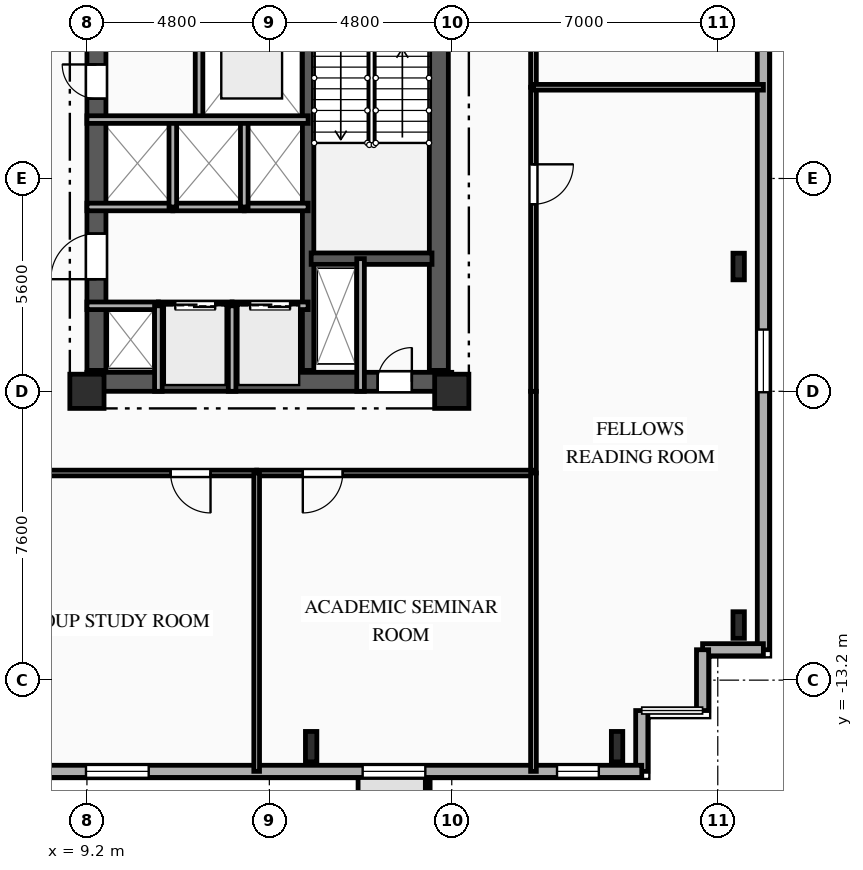
"""IFC4 building model, lengths in metres.
Left out: names, types, materials, properties, quantities, classifications, styles, units other than length and angle.
Written with IfcOpenShell. Run it as: python <this file> out.ifc"""

import sys

from ifc_helpers import new_model, si_unit, direction, frame, frame_2d, origin, origin_2d, place, context, subcontext, project, spatial, rectangle, i_section, extrude, element, fill, save


model = new_model("IFC4")
c1 = context("Model", 3, precision=1e-05, world=origin(), true_north=direction((0.0, 1.0)))
c2 = subcontext(c1, "Body", "Model", "MODEL_VIEW")
j1 = project(units=[si_unit("LENGTHUNIT", "METRE"), si_unit("PLANEANGLEUNIT", "RADIAN")], contexts=[c1])
p1 = place(None, origin())
s1 = spatial("IfcSite", under=j1, at=p1, CompositionType="ELEMENT")
p2 = place(p1, origin())
s2 = spatial("IfcBuilding", under=s1, at=p2, CompositionType="ELEMENT")
p3 = place(p2, frame((0.0, 0.0, 167.85)))
s3 = spatial("IfcBuildingStorey", under=s2, at=p3, CompositionType="ELEMENT", Elevation=167.85)
for number, where, z_axis, x_axis in (
    (1, (9.2, -5.6, 0.0), (0.0, 0.0, 1.0), (1.0, 0.0, 0.0)),
    (2, (18.8, -5.6, 0.0), (0.0, 0.0, 1.0), (1.0, 0.0, 0.0)),
):
    element("IfcColumn", number, at=place(p3, frame(where, z_axis=z_axis, x_axis=x_axis)), inside=s3, PredefinedType="COLUMN", context=c2, shape_type="SweptSolid", body=[
        extrude(rectangle(XDim=0.9, YDim=0.9, at=origin_2d()), origin(), (0.0, 0.0, 1.0), 3.35),
    ])
for number, where, z_axis, x_axis in (
    (3, (15.1, -14.95, 0.0), (0.0, 0.0, 1.0), (1.0, 0.0, 0.0)),
    (4, (23.15, -14.95, 0.0), (0.0, 0.0, 1.0), (1.0, 0.0, 0.0)),
):
    element("IfcColumn", number, at=place(p3, frame(where, z_axis=z_axis, x_axis=x_axis)), inside=s3, PredefinedType="COLUMN", context=c2, shape_type="SweptSolid", body=[
        extrude(i_section(OverallWidth=0.3, OverallDepth=0.8, WebThickness=0.018, FlangeThickness=0.033, FilletRadius=0.03, at=origin_2d()), origin(), (0.0, 0.0, 1.0), 3.35),
    ])
for number, where, z_axis, x_axis in (
    (5, (26.35, -11.75, 0.0), (0.0, 0.0, 1.0), (1.0, 0.0, 0.0)),
    (6, (26.35, -2.317, 0.0), (0.0, 0.0, 1.0), (1.0, 0.0, 0.0)),
):
    element("IfcColumn", number, at=place(p3, frame(where, z_axis=z_axis, x_axis=x_axis)), inside=s3, PredefinedType="COLUMN", context=c2, shape_type="SweptSolid", body=[
        extrude(i_section(OverallWidth=0.3, OverallDepth=0.7, WebThickness=0.017, FlangeThickness=0.032, FilletRadius=0.027, at=origin_2d()), origin(), (0.0, 0.0, 1.0), 3.35),
    ])
p4 = place(p3, frame((27.0, 17.2, 0.0), z_axis=(0.0, 0.0, 1.0), x_axis=(0.0, -1.0, 0.0)))
e7 = element("IfcWall", 7, at=p4, inside=s3, PredefinedType="SOLIDWALL", context=c2, shape_type="SweptSolid", body=[
    extrude(rectangle(XDim=29.6, YDim=0.32, at=frame_2d((14.8, 0.0))), origin(), (0.0, 0.0, 1.0), 3.04),
])
p5 = place(p4, frame((6.815, 0.0, 0.85)))
e8 = element("IfcOpeningElement", 8, at=p5, cuts=e7, PredefinedType="OPENING", context=c2, shape_type="SweptSolid", body=[
    extrude(rectangle(XDim=1.65, YDim=1.85, at=frame_2d((0.825, 0.925))), frame((0.0, 0.17, 0.0), z_axis=(0.0, -1.0, 0.0), x_axis=(1.0, 0.0, 0.0)), (0.0, 0.0, 1.0), 0.34),
])
p6 = place(p4, frame((21.175, 0.0, 0.85)))
e9 = element("IfcOpeningElement", 9, at=p6, cuts=e7, PredefinedType="OPENING", context=c2, shape_type="SweptSolid", body=[
    extrude(rectangle(XDim=1.65, YDim=1.85, at=frame_2d((0.825, 0.925))), frame((0.0, 0.17, 0.0), z_axis=(0.0, -1.0, 0.0), x_axis=(1.0, 0.0, 0.0)), (0.0, 0.0, 1.0), 0.34),
])
for number, where, z_axis, x_axis in (
    (10, (27.0, -12.4, 0.0), (0.0, 0.0, 1.0), (-1.0, 0.0, 0.0)),
    (11, (25.4, -12.4, 0.0), (0.0, 0.0, 1.0), (0.0, -1.0, 0.0)),
    (12, (23.8, -14.0, 0.0), (0.0, 0.0, 1.0), (0.0, -1.0, 0.0)),
):
    element("IfcWall", number, at=place(p3, frame(where, z_axis=z_axis, x_axis=x_axis)), inside=s3, PredefinedType="SOLIDWALL", context=c2, shape_type="SweptSolid", body=[
        extrude(rectangle(XDim=1.6, YDim=0.32, at=frame_2d((0.8, 0.0))), origin(), (0.0, 0.0, 1.0), 3.04),
    ])
p7 = place(p3, frame((23.8, -15.6, 0.0), z_axis=(0.0, 0.0, 1.0), x_axis=(-1.0, 0.0, 0.0)))
e13 = element("IfcWall", 13, at=p7, inside=s3, PredefinedType="SOLIDWALL", context=c2, shape_type="SweptSolid", body=[
    extrude(rectangle(XDim=49.6, YDim=0.32, at=frame_2d((24.8, 0.0))), origin(), (0.0, 0.0, 1.0), 3.04),
])
p8 = place(p7, frame((1.13, 0.0, 0.85)))
e14 = element("IfcOpeningElement", 14, at=p8, cuts=e13, PredefinedType="OPENING", context=c2, shape_type="SweptSolid", body=[
    extrude(rectangle(XDim=1.1, YDim=1.85, at=frame_2d((0.55, 0.925))), frame((0.0, 0.17, 0.0), z_axis=(0.0, -1.0, 0.0), x_axis=(1.0, 0.0, 0.0)), (0.0, 0.0, 1.0), 0.34),
])
p9 = place(p7, frame((5.695, 0.0, 0.85)))
e15 = element("IfcOpeningElement", 15, at=p9, cuts=e13, PredefinedType="OPENING", context=c2, shape_type="SweptSolid", body=[
    extrude(rectangle(XDim=1.65, YDim=1.85, at=frame_2d((0.825, 0.925))), frame((0.0, 0.17, 0.0), z_axis=(0.0, -1.0, 0.0), x_axis=(1.0, 0.0, 0.0)), (0.0, 0.0, 1.0), 0.34),
])
p10 = place(p7, frame((12.975, 0.0, 0.85)))
e16 = element("IfcOpeningElement", 16, at=p10, cuts=e13, PredefinedType="OPENING", context=c2, shape_type="SweptSolid", body=[
    extrude(rectangle(XDim=1.65, YDim=1.85, at=frame_2d((0.825, 0.925))), frame((0.0, 0.17, 0.0), z_axis=(0.0, -1.0, 0.0), x_axis=(1.0, 0.0, 0.0)), (0.0, 0.0, 1.0), 0.34),
])
p11 = place(p7, frame((21.636, 0.0, 0.85)))
e17 = element("IfcOpeningElement", 17, at=p11, cuts=e13, PredefinedType="OPENING", context=c2, shape_type="SweptSolid", body=[
    extrude(rectangle(XDim=2.2, YDim=1.85, at=frame_2d((1.1, 0.925))), frame((0.0, 0.17, 0.0), z_axis=(0.0, -1.0, 0.0), x_axis=(1.0, 0.0, 0.0)), (0.0, 0.0, 1.0), 0.34),
])
p12 = place(p7, frame((33.935, 0.0, 0.85)))
e18 = element("IfcOpeningElement", 18, at=p12, cuts=e13, PredefinedType="OPENING", context=c2, shape_type="SweptSolid", body=[
    extrude(rectangle(XDim=1.65, YDim=1.85, at=frame_2d((0.825, 0.925))), frame((0.0, 0.17, 0.0), z_axis=(0.0, -1.0, 0.0), x_axis=(1.0, 0.0, 0.0)), (0.0, 0.0, 1.0), 0.34),
])
p13 = place(p7, frame((41.24, 0.0, 0.85)))
e19 = element("IfcOpeningElement", 19, at=p13, cuts=e13, PredefinedType="OPENING", context=c2, shape_type="SweptSolid", body=[
    extrude(rectangle(XDim=1.65, YDim=1.85, at=frame_2d((0.825, 0.925))), frame((0.0, 0.17, 0.0), z_axis=(0.0, -1.0, 0.0), x_axis=(1.0, 0.0, 0.0)), (0.0, 0.0, 1.0), 0.34),
])
p14 = place(p7, frame((46.175, 0.0, 0.85)))
e20 = element("IfcOpeningElement", 20, at=p14, cuts=e13, PredefinedType="OPENING", context=c2, shape_type="SweptSolid", body=[
    extrude(rectangle(XDim=1.65, YDim=1.85, at=frame_2d((0.825, 0.925))), frame((0.0, 0.17, 0.0), z_axis=(0.0, -1.0, 0.0), x_axis=(1.0, 0.0, 0.0)), (0.0, 0.0, 1.0), 0.34),
])
p15 = place(p3, frame((9.2, -5.35, 0.0), z_axis=(0.0, 0.0, 1.0), x_axis=(1.0, 0.0, 0.0)))
e21 = element("IfcWall", 21, at=p15, inside=s3, PredefinedType="SHEAR", context=c2, shape_type="SweptSolid", body=[
    extrude(rectangle(XDim=9.6, YDim=0.5, at=frame_2d((4.8, 0.0))), origin(), (0.0, 0.0, 1.0), 3.04),
])
p16 = place(p15, frame((7.65, 0.0, 0.0)))
e22 = element("IfcOpeningElement", 22, at=p16, cuts=e21, PredefinedType="OPENING", context=c2, shape_type="SweptSolid", body=[
    extrude(rectangle(XDim=0.9, YDim=2.1, at=frame_2d((0.45, 1.05))), frame((0.0, 0.26, 0.0), z_axis=(0.0, -1.0, 0.0), x_axis=(1.0, 0.0, 0.0)), (0.0, 0.0, 1.0), 0.52),
])
p17 = place(p3, frame((9.45, -5.05, 0.0), z_axis=(0.0, 0.0, 1.0), x_axis=(0.0, 1.0, 0.0)))
e23 = element("IfcWall", 23, at=p17, inside=s3, PredefinedType="SHEAR", context=c2, shape_type="SweptSolid", body=[
    extrude(rectangle(XDim=10.1, YDim=0.5, at=frame_2d((5.05, 0.0))), origin(), (0.0, 0.0, 1.0), 3.04),
])
p18 = place(p17, frame((7.15, 0.0, 0.0)))
e24 = element("IfcOpeningElement", 24, at=p18, cuts=e23, PredefinedType="OPENING", context=c2, shape_type="SweptSolid", body=[
    extrude(rectangle(XDim=0.9, YDim=2.1, at=frame_2d((0.45, 1.05))), frame((0.0, 0.26, 0.0), z_axis=(0.0, -1.0, 0.0), x_axis=(1.0, 0.0, 0.0)), (0.0, 0.0, 1.0), 0.52),
])
p19 = place(p17, frame((2.4, 0.0, 0.0)))
e25 = element("IfcOpeningElement", 25, at=p19, cuts=e23, PredefinedType="OPENING", context=c2, shape_type="SweptSolid", body=[
    extrude(rectangle(XDim=1.2, YDim=2.15, at=frame_2d((0.6, 1.075))), frame((0.0, 0.26, 0.0), z_axis=(0.0, -1.0, 0.0), x_axis=(1.0, 0.0, 0.0)), (0.0, 0.0, 1.0), 0.52),
])
p20 = place(p3, frame((18.46, -5.05, 0.0), z_axis=(0.0, 0.0, 1.0), x_axis=(0.0, 1.0, 0.0)))
e26 = element("IfcWall", 26, at=p20, inside=s3, PredefinedType="SHEAR", context=c2, shape_type="SweptSolid", body=[
    extrude(rectangle(XDim=10.1, YDim=0.5, at=frame_2d((5.05, 0.0))), origin(), (0.0, 0.0, 1.0), 3.04),
])
p21 = place(p3, frame((15.02, -5.05, 0.0), z_axis=(0.0, 0.0, 1.0), x_axis=(0.0, 1.0, 0.0)))
e27 = element("IfcWall", 27, at=p21, inside=s3, PredefinedType="SHEAR", context=c2, shape_type="SweptSolid", body=[
    extrude(rectangle(XDim=10.1, YDim=0.3, at=frame_2d((5.05, 0.0))), origin(), (0.0, 0.0, 1.0), 3.04),
])
p22 = place(p3, frame((15.1, -2.11, 0.0), z_axis=(0.0, 0.0, 1.0), x_axis=(1.0, 0.0, 0.0)))
e28 = element("IfcWall", 28, at=p22, inside=s3, PredefinedType="SHEAR", context=c2, shape_type="SweptSolid", body=[
    extrude(rectangle(XDim=3.18, YDim=0.3, at=frame_2d((1.59, 0.0))), origin(), (0.0, 0.0, 1.0), 3.04),
])
p23 = place(p3, frame((16.4, -2.11, 0.0), z_axis=(0.0, 0.0, 1.0), x_axis=(0.0, -1.0, 0.0)))
e29 = element("IfcWall", 29, at=p23, inside=s3, PredefinedType="PARTITIONING", context=c2, shape_type="SweptSolid", body=[
    extrude(rectangle(XDim=3.49, YDim=0.2, at=frame_2d((1.745, 0.0))), origin(), (0.0, 0.0, 1.0), 3.04),
])
p24 = place(p3, frame((12.15, 5.6, 0.0), z_axis=(0.0, 0.0, 1.0), x_axis=(0.0, -1.0, 0.0)))
e30 = element("IfcWall", 30, at=p24, inside=s3, PredefinedType="PARTITIONING", context=c2, shape_type="SweptSolid", body=[
    extrude(rectangle(XDim=4.05, YDim=0.2, at=frame_2d((2.025, 0.0))), origin(), (0.0, 0.0, 1.0), 3.04),
])
p25 = place(p3, frame((9.2, -3.35, 0.0), z_axis=(0.0, 0.0, 1.0), x_axis=(1.0, 0.0, 0.0)))
e31 = element("IfcWall", 31, at=p25, inside=s3, PredefinedType="PARTITIONING", context=c2, shape_type="SweptSolid", body=[
    extrude(rectangle(XDim=1.88, YDim=0.2, at=frame_2d((0.94, 0.0))), origin(), (0.0, 0.0, 1.0), 2.755),
])
p26 = place(p3, frame((11.08, -3.35, 0.0), z_axis=(0.0, 0.0, 1.0), x_axis=(1.0, 0.0, 0.0)))
e32 = element("IfcWall", 32, at=p26, inside=s3, PredefinedType="PARTITIONING", context=c2, shape_type="SweptSolid", body=[
    extrude(rectangle(XDim=1.94, YDim=0.2, at=frame_2d((0.97, 0.0))), origin(), (0.0, 0.0, 1.0), 3.04),
])
p27 = place(p26, frame((0.445, 0.0, 0.0)))
e33 = element("IfcOpeningElement", 33, at=p27, cuts=e32, PredefinedType="OPENING", context=c2, shape_type="SweptSolid", body=[
    extrude(rectangle(XDim=1.05, YDim=2.1, at=frame_2d((0.525, 1.05))), frame((0.0, 0.11, 0.0), z_axis=(0.0, -1.0, 0.0), x_axis=(1.0, 0.0, 0.0)), (0.0, 0.0, 1.0), 0.22),
])
p28 = place(p3, frame((13.02, -3.35, 0.0), z_axis=(0.0, 0.0, 1.0), x_axis=(1.0, 0.0, 0.0)))
e34 = element("IfcWall", 34, at=p28, inside=s3, PredefinedType="PARTITIONING", context=c2, shape_type="SweptSolid", body=[
    extrude(rectangle(XDim=2.0, YDim=0.2, at=frame_2d((1.0, 0.0))), origin(), (0.0, 0.0, 1.0), 3.04),
])
p29 = place(p28, frame((0.475, 0.0, 0.0)))
e35 = element("IfcOpeningElement", 35, at=p29, cuts=e34, PredefinedType="OPENING", context=c2, shape_type="SweptSolid", body=[
    extrude(rectangle(XDim=1.05, YDim=2.1, at=frame_2d((0.525, 1.05))), frame((0.0, 0.11, 0.0), z_axis=(0.0, -1.0, 0.0), x_axis=(1.0, 0.0, 0.0)), (0.0, 0.0, 1.0), 0.22),
])
p30 = place(p3, frame((11.46, -0.75, 0.0), z_axis=(0.0, 0.0, 1.0), x_axis=(-1.0, 0.0, 0.0)))
e36 = element("IfcWall", 36, at=p30, inside=s3, PredefinedType="PARTITIONING", context=c2, shape_type="SweptSolid", body=[
    extrude(rectangle(XDim=2.26, YDim=0.2, at=frame_2d((1.13, 0.0))), origin(), (0.0, 0.0, 1.0), 3.04),
])
p31 = place(p3, frame((13.34, -0.75, 0.0), z_axis=(0.0, 0.0, 1.0), x_axis=(-1.0, 0.0, 0.0)))
e37 = element("IfcWall", 37, at=p31, inside=s3, PredefinedType="PARTITIONING", context=c2, shape_type="SweptSolid", body=[
    extrude(rectangle(XDim=1.88, YDim=0.2, at=frame_2d((0.94, 0.0))), origin(), (0.0, 0.0, 1.0), 3.04),
])
p32 = place(p3, frame((15.02, -0.75, 0.0), z_axis=(0.0, 0.0, 1.0), x_axis=(-1.0, 0.0, 0.0)))
e38 = element("IfcWall", 38, at=p32, inside=s3, PredefinedType="PARTITIONING", context=c2, shape_type="SweptSolid", body=[
    extrude(rectangle(XDim=1.68, YDim=0.2, at=frame_2d((0.84, 0.0))), origin(), (0.0, 0.0, 1.0), 3.04),
])
for number, where, z_axis, x_axis in (
    (39, (11.08, -5.6, 0.0), (0.0, 0.0, 1.0), (0.0, 1.0, 0.0)),
    (40, (13.02, -5.6, 0.0), (0.0, 0.0, 1.0), (0.0, 1.0, 0.0)),
):
    element("IfcWall", number, at=place(p3, frame(where, z_axis=z_axis, x_axis=x_axis)), inside=s3, PredefinedType="PARTITIONING", context=c2, shape_type="SweptSolid", body=[
        extrude(rectangle(XDim=2.25, YDim=0.2, at=frame_2d((1.125, 0.0))), origin(), (0.0, 0.0, 1.0), 3.04),
    ])
for number, where, z_axis, x_axis in (
    (41, (11.46, -0.75, 0.0), (0.0, 0.0, 1.0), (0.0, 1.0, 0.0)),
    (42, (13.34, -0.75, 0.0), (0.0, 0.0, 1.0), (0.0, 1.0, 0.0)),
):
    element("IfcWall", number, at=place(p3, frame(where, z_axis=z_axis, x_axis=x_axis)), inside=s3, PredefinedType="PARTITIONING", context=c2, shape_type="SweptSolid", body=[
        extrude(rectangle(XDim=2.3, YDim=0.2, at=frame_2d((1.15, 0.0))), origin(), (0.0, 0.0, 1.0), 3.04),
    ])
p33 = place(p3, frame((20.95, -5.6, 0.0), z_axis=(0.0, 0.0, 1.0), x_axis=(0.0, -1.0, 0.0)))
e43 = element("IfcWall", 43, at=p33, inside=s3, PredefinedType="PARTITIONING", context=c2, shape_type="SweptSolid", body=[
    extrude(rectangle(XDim=2.15, YDim=0.15, at=frame_2d((1.075, 0.0))), origin(), (0.0, 0.0, 1.0), 3.04),
])
p34 = place(p3, frame((13.667, -7.75, 0.0), z_axis=(0.0, 0.0, 1.0), x_axis=(-1.0, 0.0, 0.0)))
e44 = element("IfcWall", 44, at=p34, inside=s3, PredefinedType="PARTITIONING", context=c2, shape_type="SweptSolid", body=[
    extrude(rectangle(XDim=7.283, YDim=0.15, at=frame_2d((3.642, 0.0))), origin(), (0.0, 0.0, 1.0), 3.04),
])
p35 = place(p34, frame((1.214, 0.0, 0.0)))
e45 = element("IfcOpeningElement", 45, at=p35, cuts=e44, PredefinedType="OPENING", context=c2, shape_type="SweptSolid", body=[
    extrude(rectangle(XDim=1.05, YDim=2.15, at=frame_2d((0.525, 1.075))), frame((0.0, 0.085, 0.0), z_axis=(0.0, -1.0, 0.0), x_axis=(1.0, 0.0, 0.0)), (0.0, 0.0, 1.0), 0.17),
])
p36 = place(p3, frame((20.95, -7.75, 0.0), z_axis=(0.0, 0.0, 1.0), x_axis=(-1.0, 0.0, 0.0)))
e46 = element("IfcWall", 46, at=p36, inside=s3, PredefinedType="PARTITIONING", context=c2, shape_type="SweptSolid", body=[
    extrude(rectangle(XDim=7.283, YDim=0.15, at=frame_2d((3.642, 0.0))), origin(), (0.0, 0.0, 1.0), 3.04),
])
p37 = place(p36, frame((5.019, 0.0, 0.0)))
e47 = element("IfcOpeningElement", 47, at=p37, cuts=e46, PredefinedType="OPENING", context=c2, shape_type="SweptSolid", body=[
    extrude(rectangle(XDim=1.05, YDim=2.15, at=frame_2d((0.525, 1.075))), frame((0.0, 0.085, 0.0), z_axis=(0.0, -1.0, 0.0), x_axis=(1.0, 0.0, 0.0)), (0.0, 0.0, 1.0), 0.17),
])
p38 = place(p3, frame((20.95, 2.4, 0.0), z_axis=(0.0, 0.0, 1.0), x_axis=(0.0, -1.0, 0.0)))
e48 = element("IfcWall", 48, at=p38, inside=s3, PredefinedType="PARTITIONING", context=c2, shape_type="SweptSolid", body=[
    extrude(rectangle(XDim=8.0, YDim=0.15, at=frame_2d((4.0, 0.0))), origin(), (0.0, 0.0, 1.0), 3.04),
])
p39 = place(p38, frame((2.028, 0.0, 0.0)))
e49 = element("IfcOpeningElement", 49, at=p39, cuts=e48, PredefinedType="OPENING", context=c2, shape_type="SweptSolid", body=[
    extrude(rectangle(XDim=1.05, YDim=2.15, at=frame_2d((0.525, 1.075))), frame((0.0, 0.085, 0.0), z_axis=(0.0, -1.0, 0.0), x_axis=(1.0, 0.0, 0.0)), (0.0, 0.0, 1.0), 0.17),
])
p40 = place(p3, frame((20.95, 8.5, 0.0), z_axis=(0.0, 0.0, 1.0), x_axis=(0.0, -1.0, 0.0)))
e50 = element("IfcWall", 50, at=p40, inside=s3, PredefinedType="PARTITIONING", context=c2, shape_type="SweptSolid", body=[
    extrude(rectangle(XDim=6.1, YDim=0.15, at=frame_2d((3.05, 0.0))), origin(), (0.0, 0.0, 1.0), 3.04),
])
p41 = place(p40, frame((3.984, 0.0, 0.0)))
e51 = element("IfcOpeningElement", 51, at=p41, cuts=e50, PredefinedType="OPENING", context=c2, shape_type="SweptSolid", body=[
    extrude(rectangle(XDim=1.05, YDim=2.15, at=frame_2d((0.525, 1.075))), frame((0.0, 0.085, 0.0), z_axis=(0.0, -1.0, 0.0), x_axis=(1.0, 0.0, 0.0)), (0.0, 0.0, 1.0), 0.17),
])
p42 = place(p3, frame((20.95, 2.4, 0.0), z_axis=(0.0, 0.0, 1.0), x_axis=(1.0, 0.0, 0.0)))
e52 = element("IfcWall", 52, at=p42, inside=s3, PredefinedType="PARTITIONING", context=c2, shape_type="SweptSolid", body=[
    extrude(rectangle(XDim=6.05, YDim=0.15, at=frame_2d((3.025, 0.0))), origin(), (0.0, 0.0, 1.0), 3.04),
])
for number, where, z_axis, x_axis in (
    (53, (20.95, -15.6, 0.0), (0.0, 0.0, 1.0), (0.0, 1.0, 0.0)),
    (54, (13.667, -7.75, 0.0), (0.0, 0.0, 1.0), (0.0, -1.0, 0.0)),
):
    element("IfcWall", number, at=place(p3, frame(where, z_axis=z_axis, x_axis=x_axis)), inside=s3, PredefinedType="PARTITIONING", context=c2, shape_type="SweptSolid", body=[
        extrude(rectangle(XDim=7.85, YDim=0.15, at=frame_2d((3.925, 0.0))), origin(), (0.0, 0.0, 1.0), 3.04),
    ])
p43 = place(p3, frame((9.2, 1.55, 0.0), z_axis=(0.0, 0.0, 1.0), x_axis=(1.0, 0.0, 0.0)))
e55 = element("IfcWall", 55, at=p43, inside=s3, PredefinedType="PARTITIONING", context=c2, shape_type="SweptSolid", body=[
    extrude(rectangle(XDim=5.82, YDim=0.2, at=frame_2d((2.91, 0.0))), origin(), (0.0, 0.0, 1.0), 3.04),
])
p44 = place(p6, origin())
e56 = element("IfcWindow", 56, at=p44, inside=s3, PartitioningType="SINGLE_PANEL", PredefinedType="WINDOW", context=c2, shape_type="SweptSolid", body=[
    extrude(rectangle(XDim=1.65, YDim=1.85, at=frame_2d((0.825, 0.925))), frame((0.0, 0.03, 0.0), z_axis=(0.0, -1.0, 0.0), x_axis=(1.0, 0.0, 0.0)), (0.0, 0.0, 1.0), 0.06),
])
fill(e9, e56)
p45 = place(p8, origin())
e57 = element("IfcWindow", 57, at=p45, inside=s3, PartitioningType="SINGLE_PANEL", PredefinedType="WINDOW", context=c2, shape_type="SweptSolid", body=[
    extrude(rectangle(XDim=1.1, YDim=1.85, at=frame_2d((0.55, 0.925))), frame((0.0, 0.03, 0.0), z_axis=(0.0, -1.0, 0.0), x_axis=(1.0, 0.0, 0.0)), (0.0, 0.0, 1.0), 0.06),
])
fill(e14, e57)
p46 = place(p9, origin())
e58 = element("IfcWindow", 58, at=p46, inside=s3, PartitioningType="SINGLE_PANEL", PredefinedType="WINDOW", context=c2, shape_type="SweptSolid", body=[
    extrude(rectangle(XDim=1.65, YDim=1.85, at=frame_2d((0.825, 0.925))), frame((0.0, 0.03, 0.0), z_axis=(0.0, -1.0, 0.0), x_axis=(1.0, 0.0, 0.0)), (0.0, 0.0, 1.0), 0.06),
])
fill(e15, e58)
p47 = place(p10, origin())
e59 = element("IfcWindow", 59, at=p47, inside=s3, PartitioningType="SINGLE_PANEL", PredefinedType="WINDOW", context=c2, shape_type="SweptSolid", body=[
    extrude(rectangle(XDim=1.65, YDim=1.85, at=frame_2d((0.825, 0.925))), frame((0.0, 0.03, 0.0), z_axis=(0.0, -1.0, 0.0), x_axis=(1.0, 0.0, 0.0)), (0.0, 0.0, 1.0), 0.06),
])
fill(e16, e59)
p48 = place(p16, origin())
e60 = element("IfcDoor", 60, at=p48, inside=s3, OperationType="SINGLE_SWING_RIGHT", PredefinedType="DOOR", context=c2, shape_type="SweptSolid", body=[
    extrude(rectangle(XDim=0.9, YDim=2.1, at=frame_2d((0.45, 1.05))), frame((0.0, 0.025, 0.0), z_axis=(0.0, -1.0, 0.0), x_axis=(1.0, 0.0, 0.0)), (0.0, 0.0, 1.0), 0.05),
])
fill(e22, e60)
p49 = place(p18, origin())
e61 = element("IfcDoor", 61, at=p49, inside=s3, OperationType="SINGLE_SWING_RIGHT", PredefinedType="DOOR", context=c2, shape_type="SweptSolid", body=[
    extrude(rectangle(XDim=0.9, YDim=2.1, at=frame_2d((0.45, 1.05))), frame((0.0, 0.025, 0.0), z_axis=(0.0, -1.0, 0.0), x_axis=(1.0, 0.0, 0.0)), (0.0, 0.0, 1.0), 0.05),
])
fill(e24, e61)
p50 = place(p27, origin())
e62 = element("IfcDoor", 62, at=p50, inside=s3, OperationType="DOUBLE_DOOR_SLIDING", PredefinedType="DOOR", context=c2, shape_type="SweptSolid", body=[
    extrude(rectangle(XDim=1.05, YDim=2.1, at=frame_2d((0.525, 1.05))), frame((0.0, 0.025, 0.0), z_axis=(0.0, -1.0, 0.0), x_axis=(1.0, 0.0, 0.0)), (0.0, 0.0, 1.0), 0.05),
])
fill(e33, e62)
p51 = place(p29, origin())
e63 = element("IfcDoor", 63, at=p51, inside=s3, OperationType="DOUBLE_DOOR_SLIDING", PredefinedType="DOOR", context=c2, shape_type="SweptSolid", body=[
    extrude(rectangle(XDim=1.05, YDim=2.1, at=frame_2d((0.525, 1.05))), frame((0.0, 0.025, 0.0), z_axis=(0.0, -1.0, 0.0), x_axis=(1.0, 0.0, 0.0)), (0.0, 0.0, 1.0), 0.05),
])
fill(e35, e63)
p52 = place(p19, origin())
e64 = element("IfcDoor", 64, at=p52, inside=s3, OperationType="SINGLE_SWING_LEFT", PredefinedType="DOOR", context=c2, shape_type="SweptSolid", body=[
    extrude(rectangle(XDim=1.2, YDim=2.15, at=frame_2d((0.6, 1.075))), frame((0.0, 0.025, 0.0), z_axis=(0.0, -1.0, 0.0), x_axis=(1.0, 0.0, 0.0)), (0.0, 0.0, 1.0), 0.05),
])
fill(e25, e64)
p53 = place(p35, origin())
e65 = element("IfcDoor", 65, at=p53, inside=s3, OperationType="SINGLE_SWING_LEFT", PredefinedType="DOOR", context=c2, shape_type="SweptSolid", body=[
    extrude(rectangle(XDim=1.05, YDim=2.15, at=frame_2d((0.525, 1.075))), frame((0.0, 0.025, 0.0), z_axis=(0.0, -1.0, 0.0), x_axis=(1.0, 0.0, 0.0)), (0.0, 0.0, 1.0), 0.05),
])
fill(e45, e65)
p54 = place(p37, origin())
e66 = element("IfcDoor", 66, at=p54, inside=s3, OperationType="SINGLE_SWING_RIGHT", PredefinedType="DOOR", context=c2, shape_type="SweptSolid", body=[
    extrude(rectangle(XDim=1.05, YDim=2.15, at=frame_2d((0.525, 1.075))), frame((0.0, 0.025, 0.0), z_axis=(0.0, -1.0, 0.0), x_axis=(1.0, 0.0, 0.0)), (0.0, 0.0, 1.0), 0.05),
])
fill(e47, e66)
p55 = place(p39, origin())
e67 = element("IfcDoor", 67, at=p55, inside=s3, OperationType="SINGLE_SWING_LEFT", PredefinedType="DOOR", context=c2, shape_type="SweptSolid", body=[
    extrude(rectangle(XDim=1.05, YDim=2.15, at=frame_2d((0.525, 1.075))), frame((0.0, 0.025, 0.0), z_axis=(0.0, -1.0, 0.0), x_axis=(1.0, 0.0, 0.0)), (0.0, 0.0, 1.0), 0.05),
])
fill(e49, e67)
save(model, sys.argv[1])
